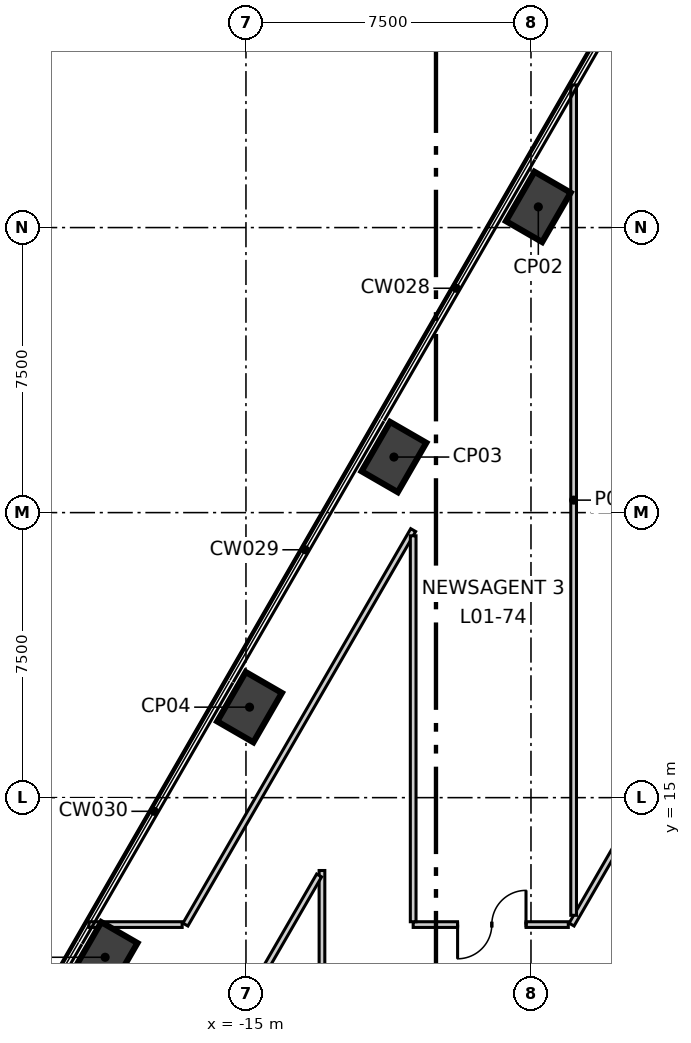
"""IFC4 building model, lengths in metres.
Left out: names, types, materials, properties, quantities, classifications, styles, units other than length and angle.
Written with IfcOpenShell. Run it as: python <this file> out.ifc"""

import sys

from ifc_helpers import new_model, si_unit, direction, frame, frame_2d, origin, origin_2d, place, context, subcontext, project, spatial, polyline, rectangle, outline, extrude, element, fill, save


model = new_model("IFC4")
c1 = context("Model", 3, precision=1e-05, world=origin(), true_north=direction((0.0, 1.0)))
c2 = subcontext(c1, "Body", "Model", "MODEL_VIEW")
j1 = project(units=[si_unit("LENGTHUNIT", "METRE"), si_unit("PLANEANGLEUNIT", "RADIAN")], contexts=[c1])
p1 = place(None, origin())
s1 = spatial("IfcSite", under=j1, at=p1, CompositionType="ELEMENT")
p2 = place(p1, origin())
s2 = spatial("IfcBuilding", under=s1, at=p2, CompositionType="ELEMENT")
p3 = place(p2, frame((0.0, 0.0, 8.5)))
s3 = spatial("IfcBuildingStorey", under=s2, at=p3, CompositionType="ELEMENT", Elevation=8.5)
p4 = place(p3, frame((-1.617, 15.2, -0.4), z_axis=(0.0, 0.0, 1.0), x_axis=(-0.499992141631, -0.866029940768, 0.0)))
e1 = element("IfcWall", 1, at=p4, inside=s3, PredefinedType="SHEAR", context=c2, shape_type="SweptSolid", body=[
    extrude(outline(polyline([(-0.289, -0.499), (1.656, -0.499), (3.601, -0.499), (5.547, -0.499), (7.492, -0.499), (9.437, -0.5), (11.382, -0.5), (13.328, -0.5), (15.273, -0.5), (17.218, -0.5), (19.163, -0.5), (21.109, -0.5), (23.054, -0.5), (24.999, -0.5), (24.422, 0.5), (22.566, 0.5), (20.709, 0.5), (18.853, 0.5), (16.997, 0.5), (15.14, 0.5), (13.284, 0.5), (11.427, 0.5), (9.571, 0.5), (7.715, 0.5), (5.858, 0.5), (4.002, 0.5), (2.146, 0.5), (0.289, 0.5), (-0.289, -0.499)])), origin(), (0.0, 0.0, 1.0), 6.0),
])
p5 = place(p4, frame((11.805, 0.0, 0.4)))
e2 = element("IfcOpeningElement", 2, at=p5, cuts=e1, PredefinedType="OPENING", context=c2, shape_type="SweptSolid", body=[
    extrude(rectangle(XDim=1.1, YDim=2.1, at=frame_2d((0.55, 1.05))), frame((0.0, 0.51, 0.0), z_axis=(0.0, -1.0, 0.0), x_axis=(1.0, 0.0, 0.0)), (0.0, 0.0, 1.0), 1.02),
])
for number, where, z_axis, x_axis in (
    (3, (-7.307, 30.544, -0.4), (0.0, 0.0, 1.0), (0.5, 0.866, 0.0)),
    (4, (-11.106, 23.962, -0.4), (0.0, 0.0, 1.0), (0.5, 0.866, 0.0)),
    (5, (-14.906, 17.381, -0.4), (0.0, 0.0, 1.0), (0.5, 0.866, 0.0)),
    (6, (-18.706, 10.8, -0.4), (0.0, 0.0, 1.0), (0.5, 0.866, 0.0)),
):
    element("IfcColumn", number, at=place(p3, frame(where, z_axis=z_axis, x_axis=x_axis)), inside=s3, PredefinedType="COLUMN", context=c2, shape_type="SweptSolid", body=[
        extrude(rectangle(XDim=1.5, YDim=1.1, at=origin_2d()), origin(), (0.0, 0.0, 1.0), 6.0),
    ])
p6 = place(p3, frame((-16.593, 11.66, 0.0), z_axis=(0.0, 0.0, 1.0), x_axis=(0.499996923339, 0.866027180088, 0.0)))
e7 = element("IfcWall", 7, at=p6, inside=s3, PredefinedType="PARTITIONING", context=c2, shape_type="SweptSolid", body=[
    extrude(rectangle(XDim=11.986, YDim=0.15, at=frame_2d((5.993, 0.0))), origin(), (0.0, 0.0, 1.0), 5.6),
])
p7 = place(p3, frame((-6.431, 11.66, 0.0), z_axis=(0.0, 0.0, 1.0), x_axis=(0.499933006778, 0.866064078884, 0.0)))
e8 = element("IfcWall", 8, at=p7, inside=s3, PredefinedType="PARTITIONING", context=c2, shape_type="SweptSolid", body=[
    extrude(rectangle(XDim=6.859, YDim=0.15, at=frame_2d((3.429, 0.0))), origin(), (0.0, 0.0, 1.0), 5.6),
])
p8 = place(p3, frame((-19.133, 11.66, 0.0), z_axis=(0.0, 0.0, 1.0), x_axis=(1.0, 0.0, 0.0)))
e9 = element("IfcWall", 9, at=p8, inside=s3, PredefinedType="PARTITIONING", context=c2, shape_type="SweptSolid", body=[
    extrude(rectangle(XDim=2.454, YDim=0.15, at=frame_2d((1.227, 0.0))), origin(), (0.0, 0.0, 1.0), 5.6),
])
p9 = place(p3, frame((-10.6, 11.66, 0.0), z_axis=(0.0, 0.0, 1.0), x_axis=(1.0, 0.0, 0.0)))
e10 = element("IfcWall", 10, at=p9, inside=s3, PredefinedType="PARTITIONING", context=c2, shape_type="SweptSolid", body=[
    extrude(rectangle(XDim=4.082, YDim=0.15, at=frame_2d((2.041, 0.0))), origin(), (0.0, 0.0, 1.0), 5.6),
])
p10 = place(p9, frame((1.169, 0.0, 0.0)))
e11 = element("IfcOpeningElement", 11, at=p10, cuts=e10, PredefinedType="OPENING", context=c2, shape_type="SweptSolid", body=[
    extrude(rectangle(XDim=1.8, YDim=2.1, at=frame_2d((0.9, 1.05))), frame((0.0, 0.085, 0.0), z_axis=(0.0, -1.0, 0.0), x_axis=(1.0, 0.0, 0.0)), (0.0, 0.0, 1.0), 0.17),
])
p11 = place(p3, frame((-10.6, 11.735, 0.0), z_axis=(0.0, 0.0, 1.0), x_axis=(0.0, 1.0, 0.0)))
e12 = element("IfcWall", 12, at=p11, inside=s3, PredefinedType="PARTITIONING", context=c2, shape_type="SweptSolid", body=[
    extrude(rectangle(XDim=10.155, YDim=0.15, at=frame_2d((5.077, 0.0))), origin(), (0.0, 0.0, 1.0), 5.6),
])
p12 = place(p3, frame((-13.0, 4.0, 0.0), z_axis=(0.0, 0.0, 1.0), x_axis=(0.0, 1.0, 0.0)))
e13 = element("IfcWall", 13, at=p12, inside=s3, PredefinedType="PARTITIONING", context=c2, shape_type="SweptSolid", body=[
    extrude(rectangle(XDim=9.083, YDim=0.15, at=frame_2d((4.542, 0.0))), origin(), (0.0, 0.0, 1.0), 5.6),
])
p13 = place(p3, frame((-6.378, 11.904, 0.0), z_axis=(0.0, 0.0, 1.0), x_axis=(0.0, 1.0, 0.0)))
e14 = element("IfcWall", 14, at=p13, inside=s3, PredefinedType="PARTITIONING", context=c2, shape_type="SweptSolid", body=[
    extrude(rectangle(XDim=21.849, YDim=0.15, at=frame_2d((10.924, 0.0))), origin(), (0.0, 0.0, 1.0), 4.85),
])
p14 = place(p3, frame((-18.244, 4.0, 0.0), z_axis=(0.0, 0.0, 1.0), x_axis=(0.499999792389, 0.866025523649, 0.0)))
e15 = element("IfcWall", 15, at=p14, inside=s3, PredefinedType="PARTITIONING", context=c2, shape_type="SweptSolid", body=[
    extrude(rectangle(XDim=10.338, YDim=0.15, at=frame_2d((5.169, 0.0))), origin(), (0.0, 0.0, 1.0), 5.6),
])
p15 = place(p14, frame((4.744, 0.0, 0.0)))
e16 = element("IfcOpeningElement", 16, at=p15, cuts=e15, PredefinedType="OPENING", context=c2, shape_type="SweptSolid", body=[
    extrude(rectangle(XDim=1.0, YDim=2.1, at=frame_2d((0.5, 1.05))), frame((0.0, 0.085, 0.0), z_axis=(0.0, -1.0, 0.0), x_axis=(1.0, 0.0, 0.0)), (0.0, 0.0, 1.0), 0.17),
])
p16 = place(p10, origin())
e17 = element("IfcDoor", 17, at=p16, inside=s3, OperationType="DOUBLE_DOOR_SINGLE_SWING", PredefinedType="DOOR", context=c2, shape_type="SweptSolid", body=[
    extrude(rectangle(XDim=1.8, YDim=2.1, at=frame_2d((0.9, 1.05))), frame((0.0, 0.025, 0.0), z_axis=(0.0, -1.0, 0.0), x_axis=(1.0, 0.0, 0.0)), (0.0, 0.0, 1.0), 0.05),
])
fill(e11, e17)
save(model, sys.argv[1])
